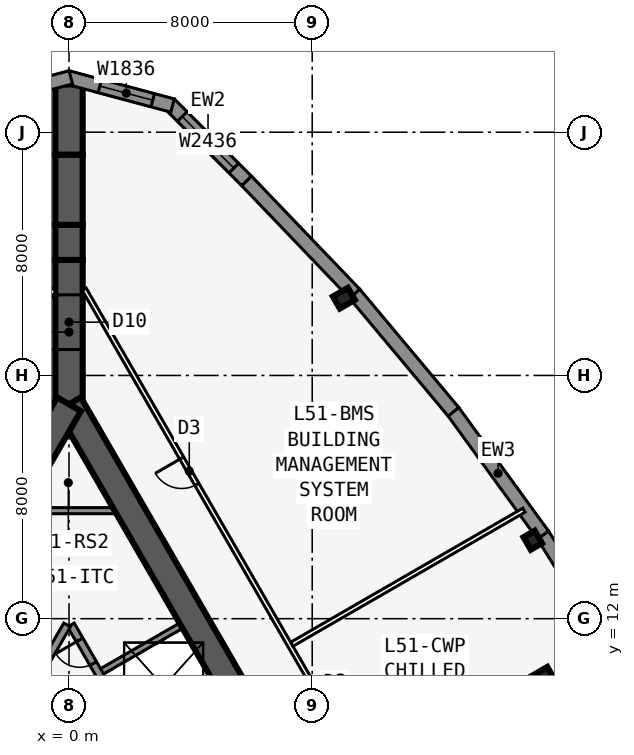
"""IFC4 building model, lengths in metres.
Left out: names, types, materials, properties, quantities, classifications, styles, units other than length and angle.
Written with IfcOpenShell. Run it as: python <this file> out.ifc"""

import sys

from ifc_helpers import new_model, si_unit, direction, frame, frame_2d, origin, origin_2d, place, context, subcontext, project, spatial, polyline, rectangle, i_section, outline, extrude, element, fill, save


model = new_model("IFC4")
c1 = context("Model", 3, precision=1e-05, world=origin(), true_north=direction((0.0, 1.0)))
c2 = subcontext(c1, "Body", "Model", "MODEL_VIEW")
j1 = project(units=[si_unit("LENGTHUNIT", "METRE"), si_unit("PLANEANGLEUNIT", "RADIAN")], contexts=[c1])
p1 = place(None, origin())
s1 = spatial("IfcSite", under=j1, at=p1, CompositionType="ELEMENT")
p2 = place(p1, origin())
s2 = spatial("IfcBuilding", under=s1, at=p2, CompositionType="ELEMENT")
p3 = place(p2, frame((0.0, 0.0, 189.5)))
s3 = spatial("IfcBuildingStorey", under=s2, at=p3, CompositionType="ELEMENT", Elevation=189.5)
p4 = place(p3, frame((8.25, 4.763, 0.0), z_axis=(0.0, 0.0, 1.0), x_axis=(-0.500002952946, 0.866023698893, 0.0)))
e1 = element("IfcWall", 1, at=p4, inside=s3, PredefinedType="SHEAR", context=c2, shape_type="SweptSolid", body=[
    extrude(rectangle(XDim=16.5, YDim=0.9, at=frame_2d((8.25, 0.0))), origin(), (0.0, 0.0, 1.0), 6.4),
])
p5 = place(p3, frame((5.379, 2.586, 0.0), z_axis=(0.0, 0.0, 1.0), x_axis=(-0.500001375892, 0.866024609411, 0.0)))
e2 = element("IfcWall", 2, at=p5, inside=s3, PredefinedType="SOLIDWALL", context=c2, shape_type="SweptSolid", body=[
    extrude(rectangle(XDim=10.633, YDim=0.25, at=frame_2d((5.316, 0.0))), origin(), (0.0, 0.0, 1.0), 6.15),
])
p6 = place(p5, frame((9.164, 0.0, 0.0)))
e3 = element("IfcOpeningElement", 3, at=p6, cuts=e2, PredefinedType="OPENING", context=c2, shape_type="SweptSolid", body=[
    extrude(rectangle(XDim=0.9, YDim=2.13, at=frame_2d((0.45, 1.065))), frame((0.0, 0.135, 0.0), z_axis=(0.0, -1.0, 0.0), x_axis=(1.0, 0.0, 0.0)), (0.0, 0.0, 1.0), 0.27),
])
p7 = place(p3, frame((0.979, 10.207, 0.0), z_axis=(0.0, 0.0, 1.0), x_axis=(0.866022959057, 0.500004234368, 0.0)))
e4 = element("IfcWall", 4, at=p7, inside=s3, PredefinedType="SOLIDWALL", context=c2, shape_type="SweptSolid", body=[
    extrude(rectangle(XDim=3.125, YDim=0.2, at=frame_2d((1.562, 0.0))), origin(), (0.0, 0.0, 1.0), 6.15),
])
p8 = place(p3, frame((0.0, 19.052, 0.0), z_axis=(0.0, 0.0, 1.0), x_axis=(-0.500002952946, -0.866023698893, 0.0)))
e5 = element("IfcWall", 5, at=p8, inside=s3, PredefinedType="SHEAR", context=c2, shape_type="SweptSolid", body=[
    extrude(rectangle(XDim=16.5, YDim=0.9, at=frame_2d((8.25, 0.0))), origin(), (0.0, 0.0, 1.0), 6.4),
])
p9 = place(p8, frame((14.15, 0.0, 0.0)))
e6 = element("IfcOpeningElement", 6, at=p9, cuts=e5, PredefinedType="OPENING", context=c2, shape_type="SweptSolid", body=[
    extrude(rectangle(XDim=1.8, YDim=2.13, at=frame_2d((0.9, 1.065))), frame((0.0, 0.46, 0.0), z_axis=(0.0, -1.0, 0.0), x_axis=(1.0, 0.0, 0.0)), (0.0, 0.0, 1.0), 0.92),
])
p10 = place(p8, frame((12.6, 0.0, 0.0)))
e7 = element("IfcOpeningElement", 7, at=p10, cuts=e5, PredefinedType="OPENING", context=c2, shape_type="SweptSolid", body=[
    extrude(rectangle(XDim=1.0, YDim=2.13, at=frame_2d((0.5, 1.065))), frame((0.0, 0.46, 0.0), z_axis=(0.0, -1.0, 0.0), x_axis=(1.0, 0.0, 0.0)), (0.0, 0.0, 1.0), 0.92),
])
p11 = place(p3, frame((-0.062, 11.794, 0.0), z_axis=(0.0, 0.0, 1.0), x_axis=(-0.500006680225, -0.86602154692, 0.0)))
e8 = element("IfcWall", 8, at=p11, inside=s3, PredefinedType="SOLIDWALL", context=c2, shape_type="SweptSolid", body=[
    extrude(rectangle(XDim=7.733, YDim=0.25, at=frame_2d((3.866, 0.0))), origin(), (0.0, 0.0, 1.0), 6.15),
])
p12 = place(p3, frame((0.0, 19.052, 0.0), z_axis=(0.0, 0.0, 1.0), x_axis=(0.0, 1.0, 0.0)))
e9 = element("IfcWall", 9, at=p12, inside=s3, PredefinedType="SHEAR", context=c2, shape_type="SweptSolid", body=[
    extrude(rectangle(XDim=4.746, YDim=0.9, at=frame_2d((2.373, 0.0))), origin(), (0.0, 0.0, 1.0), 6.4),
])
p13 = place(p12, frame((1.8, 0.0, 0.0)))
e10 = element("IfcOpeningElement", 10, at=p13, cuts=e9, PredefinedType="OPENING", context=c2, shape_type="SweptSolid", body=[
    extrude(rectangle(XDim=1.8, YDim=2.13, at=frame_2d((0.9, 1.065))), frame((0.0, 0.46, 0.0), z_axis=(0.0, -1.0, 0.0), x_axis=(1.0, 0.0, 0.0)), (0.0, 0.0, 1.0), 0.92),
])
p14 = place(p3, frame((0.0, 23.799, 0.0), z_axis=(0.0, 0.0, 1.0), x_axis=(0.0, 1.0, 0.0)))
e11 = element("IfcWall", 11, at=p14, inside=s3, PredefinedType="SHEAR", context=c2, shape_type="SweptSolid", body=[
    extrude(rectangle(XDim=1.155, YDim=0.9, at=frame_2d((0.577, 0.0))), origin(), (0.0, 0.0, 1.0), 6.4),
])
p15 = place(p3, frame((0.0, 24.953, 0.0), z_axis=(0.0, 0.0, 1.0), x_axis=(0.0, 1.0, 0.0)))
e12 = element("IfcWall", 12, at=p15, inside=s3, PredefinedType="SHEAR", context=c2, shape_type="SweptSolid", body=[
    extrude(rectangle(XDim=2.309, YDim=0.9, at=frame_2d((1.155, 0.0))), origin(), (0.0, 0.0, 1.0), 6.4),
])
p16 = place(p3, frame((0.0, 27.263, 0.0), z_axis=(0.0, 0.0, 1.0), x_axis=(0.0, 1.0, 0.0)))
e13 = element("IfcWall", 13, at=p16, inside=s3, PredefinedType="SHEAR", context=c2, shape_type="SweptSolid", body=[
    extrude(rectangle(XDim=2.31, YDim=0.9, at=frame_2d((1.155, 0.0))), origin(), (0.0, 0.0, 1.0), 6.4),
])
p17 = place(p3, frame((15.254, 14.58, 0.0), z_axis=(0.0, 0.0, 1.0), x_axis=(0.866025403784, 0.5, 0.0)))
e14 = element("IfcColumn", 14, at=p17, inside=s3, PredefinedType="COLUMN", context=c2, shape_type="SweptSolid", body=[
    extrude(i_section(OverallWidth=0.424, OverallDepth=0.475, WebThickness=0.048, FlangeThickness=0.077, at=origin_2d()), origin(), (0.0, 0.0, 1.0), 6.4),
])
p18 = place(p3, frame((9.041, 22.541, 0.0), z_axis=(0.0, 0.0, 1.0), x_axis=(-0.5, 0.866025403784, 0.0)))
e15 = element("IfcColumn", 15, at=p18, inside=s3, PredefinedType="COLUMN", context=c2, shape_type="SweptSolid", body=[
    extrude(i_section(OverallWidth=0.455, OverallDepth=0.569, WebThickness=0.078, FlangeThickness=0.125, at=origin_2d()), origin(), (0.0, 0.0, 1.0), 6.4),
])
p19 = place(p3, frame((15.312, 8.84, 0.0), z_axis=(0.0, 0.0, 1.0), x_axis=(0.866025403784, 0.5, 0.0)))
e16 = element("IfcColumn", 16, at=p19, inside=s3, PredefinedType="COLUMN", context=c2, shape_type="SweptSolid", body=[
    extrude(rectangle(XDim=2.3, YDim=2.3, at=origin_2d()), origin(), (0.0, 0.0, 1.0), 6.4),
])
p20 = place(p3, frame((18.234, 10.518, 0.0), z_axis=(0.0, 0.0, 1.0), x_axis=(-0.529990167382, 0.84800378683, 0.0)))
e17 = element("IfcWall", 17, at=p20, inside=s3, PredefinedType="SOLIDWALL", context=c2, shape_type="SweptSolid", body=[
    extrude(outline(polyline([(0.0, 0.0), (5.003, 0.0), (5.003, 6.15), (0.0, 6.15), (0.0, 0.0)]), holes=[polyline([(4.402, 3.075), (4.337, 3.567), (4.147, 4.025), (3.845, 4.418), (3.451, 4.72), (2.993, 4.91), (2.501, 4.975), (2.01, 4.91), (1.552, 4.72), (1.158, 4.418), (0.856, 4.025), (0.666, 3.567), (0.602, 3.075), (0.666, 2.583), (0.856, 2.125), (1.158, 1.731), (1.552, 1.43), (2.01, 1.24), (2.501, 1.175), (2.993, 1.24), (3.451, 1.43), (3.845, 1.731), (4.147, 2.125), (4.337, 2.583), (4.402, 3.075)])]), frame((0.0, 0.225, 0.0), z_axis=(0.0, -1.0, 0.0), x_axis=(1.0, 0.0, 0.0)), (0.0, 0.0, 1.0), 0.45),
])
p21 = place(p3, frame((15.591, 14.748, 0.0), z_axis=(0.0, 0.0, 1.0), x_axis=(-0.587692278424, 0.809084535682, 0.0)))
e18 = element("IfcWall", 18, at=p21, inside=s3, PredefinedType="SOLIDWALL", context=c2, shape_type="SweptSolid", body=[
    extrude(outline(polyline([(0.0, 0.0), (5.027, 0.0), (5.027, 6.15), (0.0, 6.15), (0.0, 0.0)]), holes=[polyline([(4.414, 3.075), (4.349, 3.567), (4.159, 4.025), (3.857, 4.418), (3.464, 4.72), (3.006, 4.91), (2.514, 4.975), (2.022, 4.91), (1.564, 4.72), (1.17, 4.418), (0.868, 4.025), (0.678, 3.567), (0.614, 3.075), (0.678, 2.583), (0.868, 2.125), (1.17, 1.731), (1.564, 1.43), (2.022, 1.24), (2.514, 1.175), (3.006, 1.24), (3.464, 1.43), (3.857, 1.731), (4.159, 2.125), (4.349, 2.583), (4.414, 3.075)])]), frame((0.0, 0.225, 0.0), z_axis=(0.0, -1.0, 0.0), x_axis=(1.0, 0.0, 0.0)), (0.0, 0.0, 1.0), 0.45),
])
p22 = place(p3, frame((12.646, 18.803, 0.0), z_axis=(0.0, 0.0, 1.0), x_axis=(-0.641810386606, 0.766863369607, 0.0)))
e19 = element("IfcWall", 19, at=p22, inside=s3, PredefinedType="SOLIDWALL", context=c2, shape_type="SweptSolid", body=[
    extrude(outline(polyline([(0.0, 0.0), (5.076, 0.0), (5.076, 6.15), (0.0, 6.15), (0.0, 0.0)]), holes=[polyline([(4.438, 3.075), (4.373, 3.567), (4.183, 4.025), (3.882, 4.418), (3.488, 4.72), (3.03, 4.91), (2.538, 4.975), (2.046, 4.91), (1.588, 4.72), (1.195, 4.418), (0.893, 4.025), (0.703, 3.567), (0.638, 3.075), (0.703, 2.583), (0.893, 2.125), (1.195, 1.731), (1.588, 1.43), (2.046, 1.24), (2.538, 1.175), (3.03, 1.24), (3.488, 1.43), (3.882, 1.731), (4.183, 2.125), (4.373, 2.583), (4.438, 3.075)])]), frame((0.0, 0.225, 0.0), z_axis=(0.0, -1.0, 0.0), x_axis=(1.0, 0.0, 0.0)), (0.0, 0.0, 1.0), 0.45),
])
p23 = place(p3, frame((9.398, 22.685, 0.0), z_axis=(0.0, 0.0, 1.0), x_axis=(-0.691719937936, 0.722165858693, 0.0)))
e20 = element("IfcWall", 20, at=p23, inside=s3, PredefinedType="SOLIDWALL", context=c2, shape_type="SweptSolid", body=[
    extrude(outline(polyline([(0.0, 0.0), (5.148, 0.0), (5.148, 6.15), (0.0, 6.15), (0.0, 0.0)]), holes=[polyline([(4.524, 3.075), (4.458, 3.58), (4.263, 4.05), (3.953, 4.454), (3.549, 4.764), (3.079, 4.958), (2.574, 5.025), (2.069, 4.958), (1.599, 4.764), (1.195, 4.454), (0.885, 4.05), (0.69, 3.58), (0.624, 3.075), (0.69, 2.57), (0.885, 2.1), (1.195, 1.696), (1.599, 1.386), (2.069, 1.191), (2.574, 1.125), (3.079, 1.191), (3.549, 1.386), (3.953, 1.696), (4.263, 2.1), (4.458, 2.57), (4.524, 3.075)])]), frame((0.0, 0.225, 0.0), z_axis=(0.0, -1.0, 0.0), x_axis=(1.0, 0.0, 0.0)), (0.0, 0.0, 1.0), 0.45),
])
p24 = place(p3, frame((5.841, 26.399, 0.0), z_axis=(0.0, 0.0, 1.0), x_axis=(-0.707106781187, 0.707106781187, 0.0)))
e21 = element("IfcWall", 21, at=p24, inside=s3, PredefinedType="SOLIDWALL", context=c2, shape_type="SweptSolid", body=[
    extrude(rectangle(XDim=3.586, YDim=0.45, at=frame_2d((1.793, 0.0))), origin(), (0.0, 0.0, 1.0), 6.15),
])
p25 = place(p24, frame((0.593, 0.0, 1.2)))
e22 = element("IfcOpeningElement", 22, at=p25, cuts=e21, PredefinedType="OPENING", context=c2, shape_type="SweptSolid", body=[
    extrude(rectangle(XDim=2.4, YDim=3.6, at=frame_2d((1.2, 1.8))), frame((0.0, 0.235, 0.0), z_axis=(0.0, -1.0, 0.0), x_axis=(1.0, 0.0, 0.0)), (0.0, 0.0, 1.0), 0.47),
])
p26 = place(p3, frame((3.406, 28.877, 0.0), z_axis=(0.0, 0.0, 1.0), x_axis=(-0.965924653531, 0.258823421857, 0.0)))
e23 = element("IfcWall", 23, at=p26, inside=s3, PredefinedType="SOLIDWALL", context=c2, shape_type="SweptSolid", body=[
    extrude(outline(polyline([(3.586, 0.225), (3.527, 0.225), (3.035, 0.093), (3.0, 0.225), (0.0, 0.225), (0.0, -0.225), (3.586, -0.225), (3.586, 0.225)])), origin(), (0.0, 0.0, 1.0), 6.15),
])
p27 = place(p26, frame((0.675, 0.0, 1.2)))
e24 = element("IfcOpeningElement", 24, at=p27, cuts=e23, PredefinedType="OPENING", context=c2, shape_type="SweptSolid", body=[
    extrude(rectangle(XDim=1.8, YDim=3.6, at=frame_2d((0.9, 1.8))), frame((0.0, 0.235, 0.0), z_axis=(0.0, -1.0, 0.0), x_axis=(1.0, 0.0, 0.0)), (0.0, 0.0, 1.0), 0.47),
])
p28 = place(p3, frame((0.058, 29.805, 0.0), z_axis=(0.0, 0.0, 1.0), x_axis=(-0.965924653531, -0.258823421857, 0.0)))
e25 = element("IfcWall", 25, at=p28, inside=s3, PredefinedType="SOLIDWALL", context=c2, shape_type="SweptSolid", body=[
    extrude(outline(polyline([(3.586, 0.225), (0.586, 0.225), (0.551, 0.093), (0.06, 0.225), (0.0, 0.225), (0.0, -0.225), (3.586, -0.225), (3.586, 0.225)])), origin(), (0.0, 0.0, 1.0), 6.15),
])
p29 = place(p28, frame((1.111, 0.0, 1.2)))
e26 = element("IfcOpeningElement", 26, at=p29, cuts=e25, PredefinedType="OPENING", context=c2, shape_type="SweptSolid", body=[
    extrude(rectangle(XDim=1.8, YDim=3.6, at=frame_2d((0.9, 1.8))), frame((0.0, 0.235, 0.0), z_axis=(0.0, -1.0, 0.0), x_axis=(1.0, 0.0, 0.0)), (0.0, 0.0, 1.0), 0.47),
])
p30 = place(p3, frame((20.027, -10.985, 0.0), z_axis=(0.0, 0.0, 1.0), x_axis=(-0.500001677587, 0.866024435227, 0.0)))
e27 = element("IfcWall", 27, at=p30, inside=s3, PredefinedType="PARTITIONING", context=c2, shape_type="SweptSolid", body=[
    extrude(rectangle(XDim=39.054, YDim=0.15, at=frame_2d((19.527, 0.0))), origin(), (0.0, 0.0, 1.0), 6.15),
])
p31 = place(p30, frame((5.914, 0.0, 0.0)))
e28 = element("IfcOpeningElement", 28, at=p31, cuts=e27, PredefinedType="OPENING", context=c2, shape_type="SweptSolid", body=[
    extrude(rectangle(XDim=1.0, YDim=2.13, at=frame_2d((0.5, 1.065))), frame((0.0, 0.085, 0.0), z_axis=(0.0, -1.0, 0.0), x_axis=(1.0, 0.0, 0.0)), (0.0, 0.0, 1.0), 0.17),
])
p32 = place(p30, frame((15.527, 0.0, 0.0)))
e29 = element("IfcOpeningElement", 29, at=p32, cuts=e27, PredefinedType="OPENING", context=c2, shape_type="SweptSolid", body=[
    extrude(rectangle(XDim=1.0, YDim=2.13, at=frame_2d((0.5, 1.065))), frame((0.0, 0.085, 0.0), z_axis=(0.0, -1.0, 0.0), x_axis=(1.0, 0.0, 0.0)), (0.0, 0.0, 1.0), 0.17),
])
p33 = place(p30, frame((22.027, 0.0, 0.0)))
e30 = element("IfcOpeningElement", 30, at=p33, cuts=e27, PredefinedType="OPENING", context=c2, shape_type="SweptSolid", body=[
    extrude(rectangle(XDim=1.0, YDim=2.13, at=frame_2d((0.5, 1.065))), frame((0.0, 0.085, 0.0), z_axis=(0.0, -1.0, 0.0), x_axis=(1.0, 0.0, 0.0)), (0.0, 0.0, 1.0), 0.17),
])
p34 = place(p30, frame((31.64, 0.0, 0.0)))
e31 = element("IfcOpeningElement", 31, at=p34, cuts=e27, PredefinedType="OPENING", context=c2, shape_type="SweptSolid", body=[
    extrude(rectangle(XDim=1.0, YDim=2.13, at=frame_2d((0.5, 1.065))), frame((0.0, 0.085, 0.0), z_axis=(0.0, -1.0, 0.0), x_axis=(1.0, 0.0, 0.0)), (0.0, 0.0, 1.0), 0.17),
])
p35 = place(p3, frame((7.329, 11.159, 0.0), z_axis=(0.0, 0.0, 1.0), x_axis=(0.866010828688, 0.500025243958, 0.0)))
e32 = element("IfcWall", 32, at=p35, inside=s3, PredefinedType="PARTITIONING", context=c2, shape_type="SweptSolid", body=[
    extrude(rectangle(XDim=8.817, YDim=0.15, at=frame_2d((4.409, 0.0))), origin(), (0.0, 0.0, 1.0), 6.15),
])
p36 = place(p3, frame((-0.5, 22.836, 0.0), z_axis=(0.0, 0.0, 1.0), x_axis=(-0.500001677587, -0.866024435227, 0.0)))
e33 = element("IfcWall", 33, at=p36, inside=s3, PredefinedType="PARTITIONING", context=c2, shape_type="SweptSolid", body=[
    extrude(rectangle(XDim=39.054, YDim=0.15, at=frame_2d((19.527, 0.0))), origin(), (0.0, 0.0, 1.0), 6.15),
])
p37 = place(p36, frame((7.914, 0.0, 0.0)))
e34 = element("IfcOpeningElement", 34, at=p37, cuts=e33, PredefinedType="OPENING", context=c2, shape_type="SweptSolid", body=[
    extrude(rectangle(XDim=1.0, YDim=2.13, at=frame_2d((0.5, 1.065))), frame((0.0, 0.085, 0.0), z_axis=(0.0, -1.0, 0.0), x_axis=(1.0, 0.0, 0.0)), (0.0, 0.0, 1.0), 0.17),
])
p38 = place(p36, frame((17.527, 0.0, 0.0)))
e35 = element("IfcOpeningElement", 35, at=p38, cuts=e33, PredefinedType="OPENING", context=c2, shape_type="SweptSolid", body=[
    extrude(rectangle(XDim=1.0, YDim=2.13, at=frame_2d((0.5, 1.065))), frame((0.0, 0.085, 0.0), z_axis=(0.0, -1.0, 0.0), x_axis=(1.0, 0.0, 0.0)), (0.0, 0.0, 1.0), 0.17),
])
p39 = place(p36, frame((28.64, 0.0, 0.0)))
e36 = element("IfcOpeningElement", 36, at=p39, cuts=e33, PredefinedType="OPENING", context=c2, shape_type="SweptSolid", body=[
    extrude(rectangle(XDim=1.0, YDim=2.13, at=frame_2d((0.5, 1.065))), frame((0.0, 0.085, 0.0), z_axis=(0.0, -1.0, 0.0), x_axis=(1.0, 0.0, 0.0)), (0.0, 0.0, 1.0), 0.17),
])
p40 = place(p3, frame((-1.501, 15.552, 0.0), z_axis=(0.0, 0.0, 1.0), x_axis=(1.0, 0.0, 0.0)))
e37 = element("IfcWall", 37, at=p40, inside=s3, PredefinedType="SOLIDWALL", context=c2, shape_type="SweptSolid", body=[
    extrude(rectangle(XDim=3.002, YDim=0.2, at=frame_2d((1.501, 0.0))), origin(), (0.0, 0.0, 1.0), 6.15),
])
p41 = place(p25, origin())
e38 = element("IfcWindow", 38, at=p41, inside=s3, PartitioningType="SINGLE_PANEL", PredefinedType="WINDOW", context=c2, shape_type="SweptSolid", body=[
    extrude(rectangle(XDim=2.4, YDim=3.6, at=frame_2d((1.2, 1.8))), frame((0.0, 0.03, 0.0), z_axis=(0.0, -1.0, 0.0), x_axis=(1.0, 0.0, 0.0)), (0.0, 0.0, 1.0), 0.06),
])
fill(e22, e38)
p42 = place(p27, origin())
e39 = element("IfcWindow", 39, at=p42, inside=s3, PartitioningType="SINGLE_PANEL", PredefinedType="WINDOW", context=c2, shape_type="SweptSolid", body=[
    extrude(rectangle(XDim=1.8, YDim=3.6, at=frame_2d((0.9, 1.8))), frame((0.0, 0.03, 0.0), z_axis=(0.0, -1.0, 0.0), x_axis=(1.0, 0.0, 0.0)), (0.0, 0.0, 1.0), 0.06),
])
fill(e24, e39)
p43 = place(p34, origin())
e40 = element("IfcDoor", 40, at=p43, inside=s3, OperationType="SINGLE_SWING_RIGHT", PredefinedType="DOOR", context=c2, shape_type="SweptSolid", body=[
    extrude(rectangle(XDim=1.0, YDim=2.13, at=frame_2d((0.5, 1.065))), frame((0.0, 0.025, 0.0), z_axis=(0.0, -1.0, 0.0), x_axis=(1.0, 0.0, 0.0)), (0.0, 0.0, 1.0), 0.05),
])
fill(e31, e40)
p44 = place(p13, origin())
e41 = element("IfcDoor", 41, at=p44, inside=s3, OperationType="DOUBLE_DOOR_DOUBLE_SWING", PredefinedType="DOOR", context=c2, shape_type="SweptSolid", body=[
    extrude(rectangle(XDim=1.8, YDim=2.13, at=frame_2d((0.9, 1.065))), frame((0.0, 0.025, 0.0), z_axis=(0.0, -1.0, 0.0), x_axis=(1.0, 0.0, 0.0)), (0.0, 0.0, 1.0), 0.05),
])
fill(e10, e41)
p45 = place(p6, origin())
e42 = element("IfcDoor", 42, at=p45, inside=s3, OperationType="SINGLE_SWING_RIGHT", PredefinedType="DOOR", context=c2, shape_type="SweptSolid", body=[
    extrude(rectangle(XDim=0.9, YDim=2.13, at=frame_2d((0.45, 1.065))), frame((0.0, 0.025, 0.0), z_axis=(0.0, -1.0, 0.0), x_axis=(1.0, 0.0, 0.0)), (0.0, 0.0, 1.0), 0.05),
])
fill(e3, e42)
save(model, sys.argv[1])
